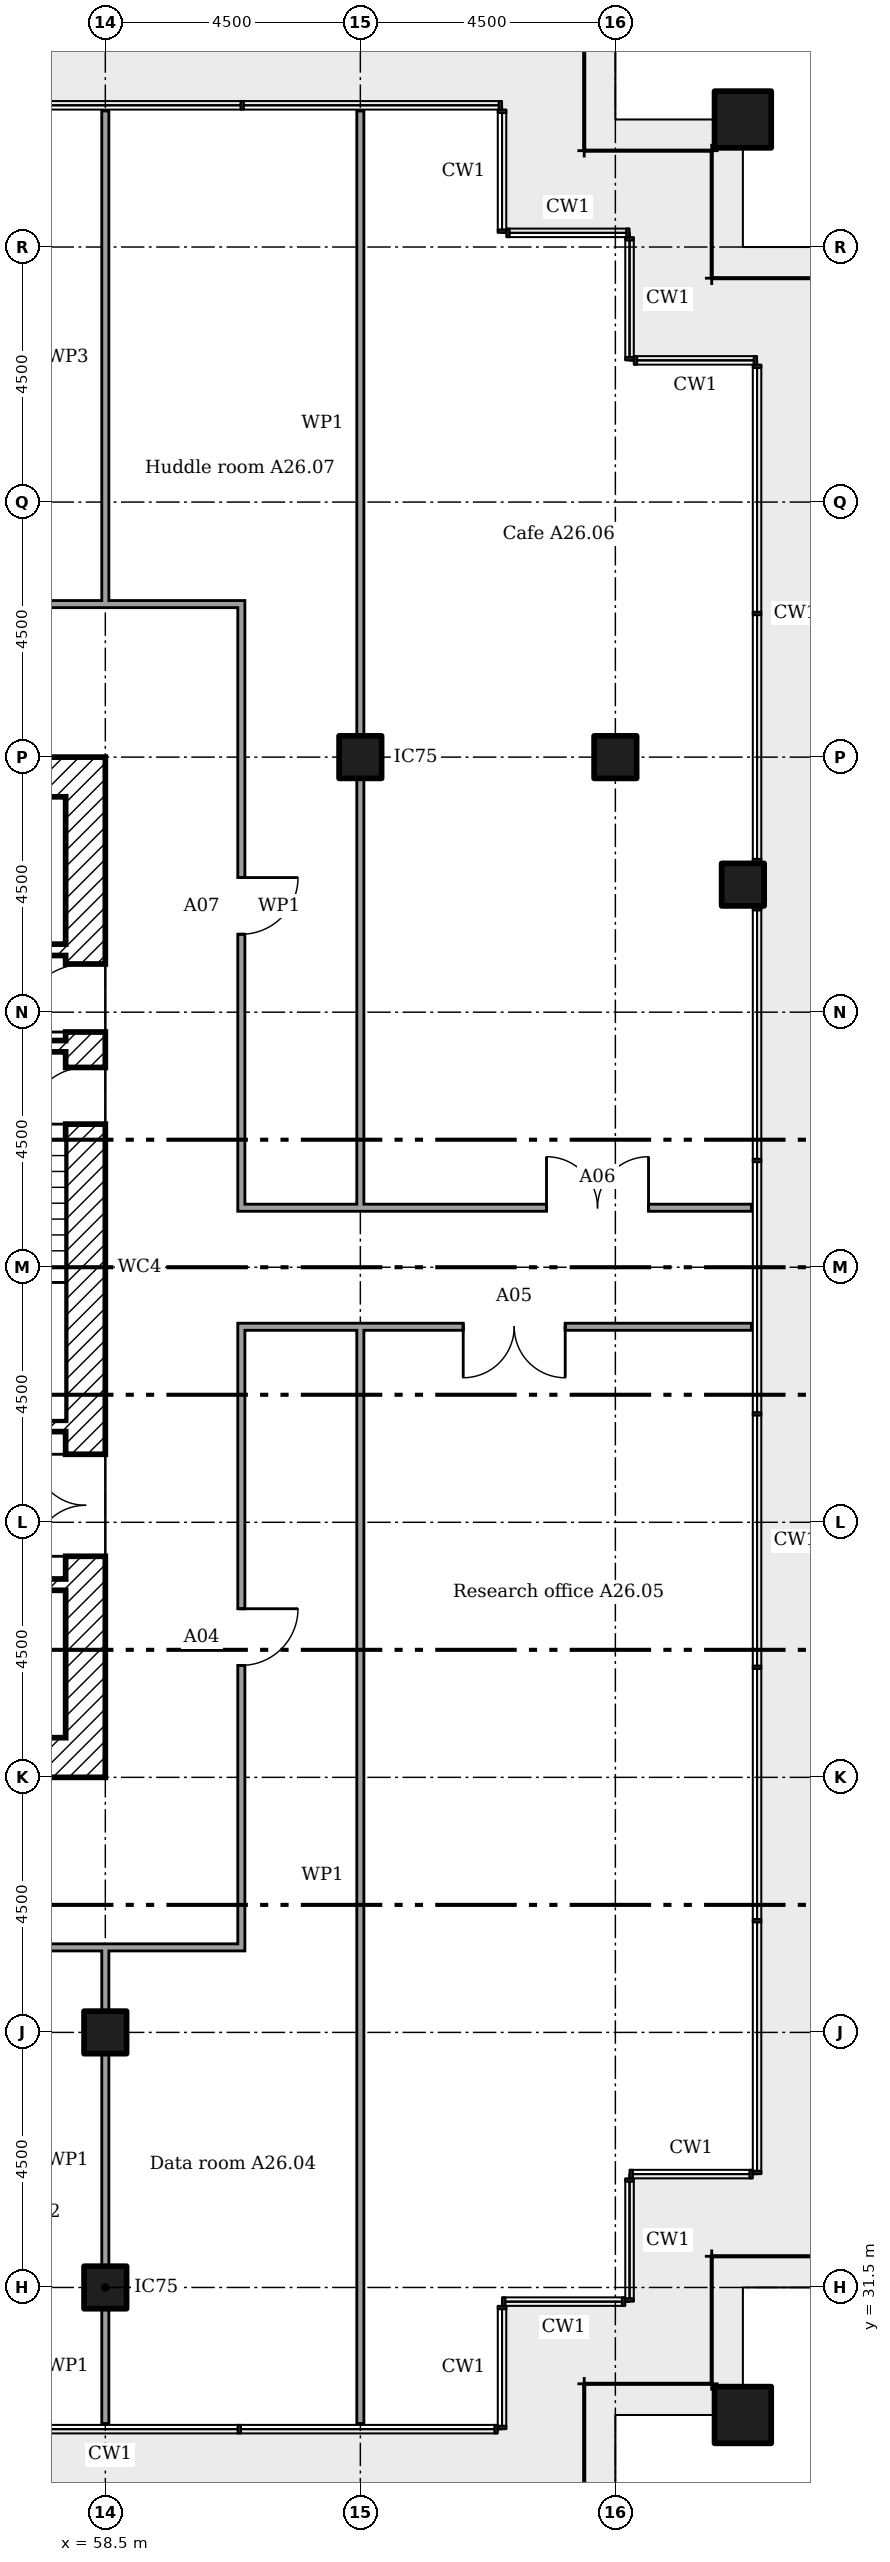
"""IFC4 building model, lengths in metres.
Left out: names, types, materials, properties, quantities, classifications, styles, units other than length and angle.
Written with IfcOpenShell. Run it as: python <this file> out.ifc"""

import sys

from ifc_helpers import new_model, si_unit, direction, frame, frame_2d, origin, origin_2d, place, context, subcontext, project, spatial, rectangle, extrude, element, fill, save


model = new_model("IFC4")
c1 = context("Model", 3, precision=1e-05, world=origin(), true_north=direction((0.0, 1.0)))
c2 = subcontext(c1, "Body", "Model", "MODEL_VIEW")
j1 = project(units=[si_unit("LENGTHUNIT", "METRE"), si_unit("PLANEANGLEUNIT", "RADIAN")], contexts=[c1])
p1 = place(None, origin())
s1 = spatial("IfcSite", under=j1, at=p1, CompositionType="ELEMENT")
p2 = place(p1, origin())
s2 = spatial("IfcBuilding", under=s1, at=p2, CompositionType="ELEMENT")
p3 = place(p2, frame((0.0, 0.0, 106.4)))
s3 = spatial("IfcBuildingStorey", under=s2, at=p3, CompositionType="ELEMENT", Elevation=106.4)
for number, where in (
    (1, (69.75, 29.25, 0.0)),
    (2, (69.75, 69.75, 0.0)),
):
    element("IfcColumn", number, at=place(p3, frame(where)), inside=s3, PredefinedType="COLUMN", context=c2, shape_type="SweptSolid", body=[
        extrude(rectangle(XDim=1.0, YDim=1.0, at=origin_2d()), origin(), (0.0, 0.0, 1.0), 3.6),
    ])
for number, where in (
    (3, (58.5, 31.5, 0.0)),
    (4, (58.5, 36.0, 0.0)),
    (5, (63.0, 58.5, 0.0)),
    (6, (67.5, 58.5, 0.0)),
    (7, (69.75, 56.25, 0.0)),
):
    element("IfcColumn", number, at=place(p3, frame(where)), inside=s3, PredefinedType="COLUMN", context=c2, shape_type="SweptSolid", body=[
        extrude(rectangle(XDim=0.75, YDim=0.75, at=origin_2d()), origin(), (0.0, 0.0, 1.0), 3.6),
    ])
p4 = place(p3, frame((58.15, 40.5, 0.0), z_axis=(0.0, 0.0, 1.0), x_axis=(0.0, 1.0, 0.0)))
e8 = element("IfcWall", 8, at=p4, inside=s3, PredefinedType="SHEAR", context=c2, shape_type="SweptSolid", body=[
    extrude(rectangle(XDim=18.0, YDim=0.7, at=frame_2d((9.0, 0.0))), origin(), (0.0, 0.0, 1.0), 3.35),
])
p5 = place(p4, frame((13.15, 0.0, 0.0)))
e9 = element("IfcOpeningElement", 9, at=p5, cuts=e8, PredefinedType="OPENING", context=c2, shape_type="SweptSolid", body=[
    extrude(rectangle(XDim=1.2, YDim=2.1, at=frame_2d((0.6, 1.05))), frame((0.0, 0.36, 0.0), z_axis=(0.0, -1.0, 0.0), x_axis=(1.0, 0.0, 0.0)), (0.0, 0.0, 1.0), 0.72),
])
p6 = place(p4, frame((3.9, 0.0, 0.0)))
e10 = element("IfcOpeningElement", 10, at=p6, cuts=e8, PredefinedType="OPENING", context=c2, shape_type="SweptSolid", body=[
    extrude(rectangle(XDim=1.8, YDim=2.1, at=frame_2d((0.9, 1.05))), frame((0.0, 0.36, 0.0), z_axis=(0.0, -1.0, 0.0), x_axis=(1.0, 0.0, 0.0)), (0.0, 0.0, 1.0), 0.72),
])
p7 = place(p4, frame((11.525, 0.0, 0.0)))
e11 = element("IfcOpeningElement", 11, at=p7, cuts=e8, PredefinedType="OPENING", context=c2, shape_type="SweptSolid", body=[
    extrude(rectangle(XDim=1.0, YDim=2.1, at=frame_2d((0.5, 1.05))), frame((0.0, 0.36, 0.0), z_axis=(0.0, -1.0, 0.0), x_axis=(1.0, 0.0, 0.0)), (0.0, 0.0, 1.0), 0.72),
])
for number, where in (
    (12, (41.2, 58.15, 0.0)),
    (13, (41.2, 40.85, 0.0)),
):
    element("IfcWall", number, at=place(p3, frame(where)), inside=s3, PredefinedType="SHEAR", context=c2, shape_type="SweptSolid", body=[
        extrude(rectangle(XDim=16.6, YDim=0.7, at=frame_2d((8.3, 0.0))), origin(), (0.0, 0.0, 1.0), 3.35),
    ])
p8 = place(p3, frame((46.933, 55.1, 0.0)))
e14 = element("IfcWall", 14, at=p8, inside=s3, PredefinedType="SHEAR", context=c2, shape_type="SweptSolid", body=[
    extrude(rectangle(XDim=10.867, YDim=0.2, at=frame_2d((5.433, 0.0))), origin(), (0.0, 0.0, 1.0), 3.35),
])
p9 = place(p8, frame((8.833, 0.0, 0.0)))
e15 = element("IfcOpeningElement", 15, at=p9, cuts=e14, PredefinedType="OPENING", context=c2, shape_type="SweptSolid", body=[
    extrude(rectangle(XDim=0.9, YDim=2.1, at=frame_2d((0.45, 1.05))), frame((0.0, 0.11, 0.0), z_axis=(0.0, -1.0, 0.0), x_axis=(1.0, 0.0, 0.0)), (0.0, 0.0, 1.0), 0.22),
])
p10 = place(p8, frame((2.117, 0.0, 0.0)))
e16 = element("IfcOpeningElement", 16, at=p10, cuts=e14, PredefinedType="OPENING", context=c2, shape_type="SweptSolid", body=[
    extrude(rectangle(XDim=0.9, YDim=2.1, at=frame_2d((0.45, 1.05))), frame((0.0, 0.11, 0.0), z_axis=(0.0, -1.0, 0.0), x_axis=(1.0, 0.0, 0.0)), (0.0, 0.0, 1.0), 0.22),
])
p11 = place(p8, frame((6.117, 0.0, 0.0)))
e17 = element("IfcOpeningElement", 17, at=p11, cuts=e14, PredefinedType="OPENING", context=c2, shape_type="SweptSolid", body=[
    extrude(rectangle(XDim=0.9, YDim=2.1, at=frame_2d((0.45, 1.05))), frame((0.0, 0.11, 0.0), z_axis=(0.0, -1.0, 0.0), x_axis=(1.0, 0.0, 0.0)), (0.0, 0.0, 1.0), 0.22),
])
p12 = place(p3, frame((41.2, 43.9, 0.0)))
e18 = element("IfcWall", 18, at=p12, inside=s3, PredefinedType="SHEAR", context=c2, shape_type="SweptSolid", body=[
    extrude(rectangle(XDim=16.6, YDim=0.2, at=frame_2d((8.3, 0.0))), origin(), (0.0, 0.0, 1.0), 3.35),
])
p13 = place(p12, frame((1.033, 0.0, 0.0)))
e19 = element("IfcOpeningElement", 19, at=p13, cuts=e18, PredefinedType="OPENING", context=c2, shape_type="SweptSolid", body=[
    extrude(rectangle(XDim=1.2, YDim=2.1, at=frame_2d((0.6, 1.05))), frame((0.0, 0.11, 0.0), z_axis=(0.0, -1.0, 0.0), x_axis=(1.0, 0.0, 0.0)), (0.0, 0.0, 1.0), 0.22),
])
p14 = place(p12, frame((3.7, 0.0, 0.0)))
e20 = element("IfcOpeningElement", 20, at=p14, cuts=e18, PredefinedType="OPENING", context=c2, shape_type="SweptSolid", body=[
    extrude(rectangle(XDim=1.2, YDim=2.1, at=frame_2d((0.6, 1.05))), frame((0.0, 0.11, 0.0), z_axis=(0.0, -1.0, 0.0), x_axis=(1.0, 0.0, 0.0)), (0.0, 0.0, 1.0), 0.22),
])
p15 = place(p12, frame((6.367, 0.0, 0.0)))
e21 = element("IfcOpeningElement", 21, at=p15, cuts=e18, PredefinedType="OPENING", context=c2, shape_type="SweptSolid", body=[
    extrude(rectangle(XDim=1.2, YDim=2.1, at=frame_2d((0.6, 1.05))), frame((0.0, 0.11, 0.0), z_axis=(0.0, -1.0, 0.0), x_axis=(1.0, 0.0, 0.0)), (0.0, 0.0, 1.0), 0.22),
])
p16 = place(p12, frame((9.033, 0.0, 0.0)))
e22 = element("IfcOpeningElement", 22, at=p16, cuts=e18, PredefinedType="OPENING", context=c2, shape_type="SweptSolid", body=[
    extrude(rectangle(XDim=1.2, YDim=2.1, at=frame_2d((0.6, 1.05))), frame((0.0, 0.11, 0.0), z_axis=(0.0, -1.0, 0.0), x_axis=(1.0, 0.0, 0.0)), (0.0, 0.0, 1.0), 0.22),
])
p17 = place(p3, frame((54.8, 53.4, 0.0)))
e23 = element("IfcWall", 23, at=p17, inside=s3, PredefinedType="SHEAR", context=c2, shape_type="SweptSolid", body=[
    extrude(rectangle(XDim=3.0, YDim=0.2, at=frame_2d((1.5, 0.0))), origin(), (0.0, 0.0, 1.0), 3.35),
])
p18 = place(p17, frame((0.95, 0.0, 0.0)))
e24 = element("IfcOpeningElement", 24, at=p18, cuts=e23, PredefinedType="OPENING", context=c2, shape_type="SweptSolid", body=[
    extrude(rectangle(XDim=1.0, YDim=2.1, at=frame_2d((0.5, 1.05))), frame((0.0, 0.11, 0.0), z_axis=(0.0, -1.0, 0.0), x_axis=(1.0, 0.0, 0.0)), (0.0, 0.0, 1.0), 0.22),
])
p19 = place(p3, frame((54.8, 46.7, 0.0)))
e25 = element("IfcWall", 25, at=p19, inside=s3, PredefinedType="SHEAR", context=c2, shape_type="SweptSolid", body=[
    extrude(rectangle(XDim=3.0, YDim=0.2, at=frame_2d((1.5, 0.0))), origin(), (0.0, 0.0, 1.0), 3.35),
])
p20 = place(p3, frame((42.438, 37.5, 0.0)))
e26 = element("IfcWall", 26, at=p20, inside=s3, PredefinedType="PARTITIONING", context=c2, shape_type="SweptSolid", body=[
    extrude(rectangle(XDim=18.525, YDim=0.125, at=frame_2d((9.262, 0.0))), origin(), (0.0, 0.0, 1.0), 3.45),
])
p21 = place(p20, frame((6.562, 0.0, 0.0)))
e27 = element("IfcOpeningElement", 27, at=p21, cuts=e26, PredefinedType="OPENING", context=c2, shape_type="SweptSolid", body=[
    extrude(rectangle(XDim=1.0, YDim=2.1, at=frame_2d((0.5, 1.05))), frame((0.0, 0.073, 0.0), z_axis=(0.0, -1.0, 0.0), x_axis=(1.0, 0.0, 0.0)), (0.0, 0.0, 1.0), 0.145),
])
p22 = place(p20, frame((12.857, 0.0, 0.0)))
e28 = element("IfcOpeningElement", 28, at=p22, cuts=e26, PredefinedType="OPENING", context=c2, shape_type="SweptSolid", body=[
    extrude(rectangle(XDim=1.0, YDim=2.1, at=frame_2d((0.5, 1.05))), frame((0.0, 0.073, 0.0), z_axis=(0.0, -1.0, 0.0), x_axis=(1.0, 0.0, 0.0)), (0.0, 0.0, 1.0), 0.145),
])
p23 = place(p20, frame((0.429, 0.0, 0.0)))
e29 = element("IfcOpeningElement", 29, at=p23, cuts=e26, PredefinedType="OPENING", context=c2, shape_type="SweptSolid", body=[
    extrude(rectangle(XDim=1.8, YDim=2.1, at=frame_2d((0.9, 1.05))), frame((0.0, 0.073, 0.0), z_axis=(0.0, -1.0, 0.0), x_axis=(1.0, 0.0, 0.0)), (0.0, 0.0, 1.0), 0.145),
])
p24 = place(p3, frame((60.837, 48.45, 0.0)))
e30 = element("IfcWall", 30, at=p24, inside=s3, PredefinedType="PARTITIONING", context=c2, shape_type="SweptSolid", body=[
    extrude(rectangle(XDim=9.062, YDim=0.125, at=frame_2d((4.531, 0.0))), origin(), (0.0, 0.0, 1.0), 3.45),
])
p25 = place(p24, frame((3.978, 0.0, 0.0)))
e31 = element("IfcOpeningElement", 31, at=p25, cuts=e30, PredefinedType="OPENING", context=c2, shape_type="SweptSolid", body=[
    extrude(rectangle(XDim=1.8, YDim=2.1, at=frame_2d((0.9, 1.05))), frame((0.0, 0.073, 0.0), z_axis=(0.0, -1.0, 0.0), x_axis=(1.0, 0.0, 0.0)), (0.0, 0.0, 1.0), 0.145),
])
p26 = place(p3, frame((60.837, 50.55, 0.0)))
e32 = element("IfcWall", 32, at=p26, inside=s3, PredefinedType="PARTITIONING", context=c2, shape_type="SweptSolid", body=[
    extrude(rectangle(XDim=9.062, YDim=0.125, at=frame_2d((4.531, 0.0))), origin(), (0.0, 0.0, 1.0), 3.45),
])
p27 = place(p26, frame((5.448, 0.0, 0.0)))
e33 = element("IfcOpeningElement", 33, at=p27, cuts=e32, PredefinedType="OPENING", context=c2, shape_type="SweptSolid", body=[
    extrude(rectangle(XDim=1.8, YDim=2.1, at=frame_2d((0.9, 1.05))), frame((0.0, 0.073, 0.0), z_axis=(0.0, -1.0, 0.0), x_axis=(1.0, 0.0, 0.0)), (0.0, 0.0, 1.0), 0.145),
])
p28 = place(p3, frame((50.488, 61.2, 0.0)))
e34 = element("IfcWall", 34, at=p28, inside=s3, PredefinedType="PARTITIONING", context=c2, shape_type="SweptSolid", body=[
    extrude(rectangle(XDim=10.475, YDim=0.125, at=frame_2d((5.237, 0.0))), origin(), (0.0, 0.0, 1.0), 3.45),
])
p29 = place(p3, frame((58.5, 29.1, 0.0), z_axis=(0.0, 0.0, 1.0), x_axis=(0.0, 1.0, 0.0)))
e35 = element("IfcWall", 35, at=p29, inside=s3, PredefinedType="PARTITIONING", context=c2, shape_type="SweptSolid", body=[
    extrude(rectangle(XDim=2.025, YDim=0.125, at=frame_2d((1.012, 0.0))), origin(), (0.0, 0.0, 1.0), 2.676),
])
p30 = place(p3, frame((58.5, 31.875, 0.0), z_axis=(0.0, 0.0, 1.0), x_axis=(0.0, 1.0, 0.0)))
e36 = element("IfcWall", 36, at=p30, inside=s3, PredefinedType="PARTITIONING", context=c2, shape_type="SweptSolid", body=[
    extrude(rectangle(XDim=3.75, YDim=0.125, at=frame_2d((1.875, 0.0))), origin(), (0.0, 0.0, 1.0), 2.676),
])
p31 = place(p3, frame((58.5, 36.375, 0.0), z_axis=(0.0, 0.0, 1.0), x_axis=(0.0, 1.0, 0.0)))
e37 = element("IfcWall", 37, at=p31, inside=s3, PredefinedType="PARTITIONING", context=c2, shape_type="SweptSolid", body=[
    extrude(rectangle(XDim=1.125, YDim=0.125, at=frame_2d((0.562, 0.0))), origin(), (0.0, 0.0, 1.0), 2.676),
])
p32 = place(p3, frame((58.5, 61.2, 0.0), z_axis=(0.0, 0.0, 1.0), x_axis=(0.0, 1.0, 0.0)))
e38 = element("IfcWall", 38, at=p32, inside=s3, PredefinedType="MOVABLE", context=c2, shape_type="SweptSolid", body=[
    extrude(rectangle(XDim=8.7, YDim=0.125, at=frame_2d((4.35, 0.0))), origin(), (0.0, 0.0, 1.0), 2.766),
])
p33 = place(p3, frame((60.9, 37.562, 0.0), z_axis=(0.0, 0.0, 1.0), x_axis=(0.0, 1.0, 0.0)))
e39 = element("IfcWall", 39, at=p33, inside=s3, PredefinedType="PARTITIONING", context=c2, shape_type="SweptSolid", body=[
    extrude(rectangle(XDim=10.825, YDim=0.125, at=frame_2d((5.413, 0.0))), origin(), (0.0, 0.0, 1.0), 3.45),
])
p34 = place(p33, frame((4.913, 0.0, 0.0)))
e40 = element("IfcOpeningElement", 40, at=p34, cuts=e39, PredefinedType="OPENING", context=c2, shape_type="SweptSolid", body=[
    extrude(rectangle(XDim=1.0, YDim=2.1, at=frame_2d((0.5, 1.05))), frame((0.0, 0.073, 0.0), z_axis=(0.0, -1.0, 0.0), x_axis=(1.0, 0.0, 0.0)), (0.0, 0.0, 1.0), 0.145),
])
p35 = place(p3, frame((60.9, 50.613, 0.0), z_axis=(0.0, 0.0, 1.0), x_axis=(0.0, 1.0, 0.0)))
e41 = element("IfcWall", 41, at=p35, inside=s3, PredefinedType="PARTITIONING", context=c2, shape_type="SweptSolid", body=[
    extrude(rectangle(XDim=10.525, YDim=0.125, at=frame_2d((5.262, 0.0))), origin(), (0.0, 0.0, 1.0), 3.45),
])
p36 = place(p35, frame((4.762, 0.0, 0.0)))
e42 = element("IfcOpeningElement", 42, at=p36, cuts=e41, PredefinedType="OPENING", context=c2, shape_type="SweptSolid", body=[
    extrude(rectangle(XDim=1.0, YDim=2.1, at=frame_2d((0.5, 1.05))), frame((0.0, 0.073, 0.0), z_axis=(0.0, -1.0, 0.0), x_axis=(1.0, 0.0, 0.0)), (0.0, 0.0, 1.0), 0.145),
])
p37 = place(p3, frame((63.0, 29.1, 0.0), z_axis=(0.0, 0.0, 1.0), x_axis=(0.0, 1.0, 0.0)))
e43 = element("IfcWall", 43, at=p37, inside=s3, PredefinedType="PARTITIONING", context=c2, shape_type="SweptSolid", body=[
    extrude(rectangle(XDim=19.35, YDim=0.125, at=frame_2d((9.675, 0.0))), origin(), (0.0, 0.0, 1.0), 3.45),
])
p38 = place(p3, frame((63.0, 50.55, 0.0), z_axis=(0.0, 0.0, 1.0), x_axis=(0.0, 1.0, 0.0)))
e44 = element("IfcWall", 44, at=p38, inside=s3, PredefinedType="PARTITIONING", context=c2, shape_type="SweptSolid", body=[
    extrude(rectangle(XDim=7.575, YDim=0.125, at=frame_2d((3.788, 0.0))), origin(), (0.0, 0.0, 1.0), 3.45),
])
p39 = place(p3, frame((63.0, 58.875, 0.0), z_axis=(0.0, 0.0, 1.0), x_axis=(0.0, 1.0, 0.0)))
e45 = element("IfcWall", 45, at=p39, inside=s3, PredefinedType="PARTITIONING", context=c2, shape_type="SweptSolid", body=[
    extrude(rectangle(XDim=11.025, YDim=0.125, at=frame_2d((5.512, 0.0))), origin(), (0.0, 0.0, 1.0), 2.766),
])
p40 = place(p5, origin())
e46 = element("IfcDoor", 46, at=p40, inside=s3, OperationType="SINGLE_SWING_RIGHT", PredefinedType="DOOR", context=c2, shape_type="SweptSolid", body=[
    extrude(rectangle(XDim=1.2, YDim=2.1, at=frame_2d((0.6, 1.05))), frame((0.0, 0.025, 0.0), z_axis=(0.0, -1.0, 0.0), x_axis=(1.0, 0.0, 0.0)), (0.0, 0.0, 1.0), 0.05),
])
fill(e9, e46)
p41 = place(p6, origin())
e47 = element("IfcDoor", 47, at=p41, inside=s3, OperationType="DOUBLE_DOOR_SINGLE_SWING", PredefinedType="DOOR", context=c2, shape_type="SweptSolid", body=[
    extrude(rectangle(XDim=1.8, YDim=2.1, at=frame_2d((0.9, 1.05))), frame((0.0, 0.025, 0.0), z_axis=(0.0, -1.0, 0.0), x_axis=(1.0, 0.0, 0.0)), (0.0, 0.0, 1.0), 0.05),
])
fill(e10, e47)
p42 = place(p7, origin())
e48 = element("IfcDoor", 48, at=p42, inside=s3, OperationType="SINGLE_SWING_RIGHT", PredefinedType="DOOR", context=c2, shape_type="SweptSolid", body=[
    extrude(rectangle(XDim=1.0, YDim=2.1, at=frame_2d((0.5, 1.05))), frame((0.0, 0.025, 0.0), z_axis=(0.0, -1.0, 0.0), x_axis=(1.0, 0.0, 0.0)), (0.0, 0.0, 1.0), 0.05),
])
fill(e11, e48)
p43 = place(p34, frame((1.0, 0.0, 0.0), x_axis=(-1.0, 0.0, 0.0)))
e49 = element("IfcDoor", 49, at=p43, inside=s3, OperationType="SINGLE_SWING_RIGHT", PredefinedType="DOOR", context=c2, shape_type="SweptSolid", body=[
    extrude(rectangle(XDim=1.0, YDim=2.1, at=frame_2d((0.5, 1.05))), frame((0.0, 0.025, 0.0), z_axis=(0.0, -1.0, 0.0), x_axis=(1.0, 0.0, 0.0)), (0.0, 0.0, 1.0), 0.05),
])
fill(e40, e49)
p44 = place(p25, frame((1.8, 0.0, 0.0), x_axis=(-1.0, 0.0, 0.0)))
e50 = element("IfcDoor", 50, at=p44, inside=s3, OperationType="DOUBLE_DOOR_SINGLE_SWING", PredefinedType="DOOR", context=c2, shape_type="SweptSolid", body=[
    extrude(rectangle(XDim=1.8, YDim=2.1, at=frame_2d((0.9, 1.05))), frame((0.0, 0.025, 0.0), z_axis=(0.0, -1.0, 0.0), x_axis=(1.0, 0.0, 0.0)), (0.0, 0.0, 1.0), 0.05),
])
fill(e31, e50)
p45 = place(p27, origin())
e51 = element("IfcDoor", 51, at=p45, inside=s3, OperationType="DOUBLE_DOOR_SINGLE_SWING", PredefinedType="DOOR", context=c2, shape_type="SweptSolid", body=[
    extrude(rectangle(XDim=1.8, YDim=2.1, at=frame_2d((0.9, 1.05))), frame((0.0, 0.025, 0.0), z_axis=(0.0, -1.0, 0.0), x_axis=(1.0, 0.0, 0.0)), (0.0, 0.0, 1.0), 0.05),
])
fill(e33, e51)
p46 = place(p36, frame((1.0, 0.0, 0.0), x_axis=(-1.0, 0.0, 0.0)))
e52 = element("IfcDoor", 52, at=p46, inside=s3, OperationType="SINGLE_SWING_RIGHT", PredefinedType="DOOR", context=c2, shape_type="SweptSolid", body=[
    extrude(rectangle(XDim=1.0, YDim=2.1, at=frame_2d((0.5, 1.05))), frame((0.0, 0.025, 0.0), z_axis=(0.0, -1.0, 0.0), x_axis=(1.0, 0.0, 0.0)), (0.0, 0.0, 1.0), 0.05),
])
fill(e42, e52)
save(model, sys.argv[1])
